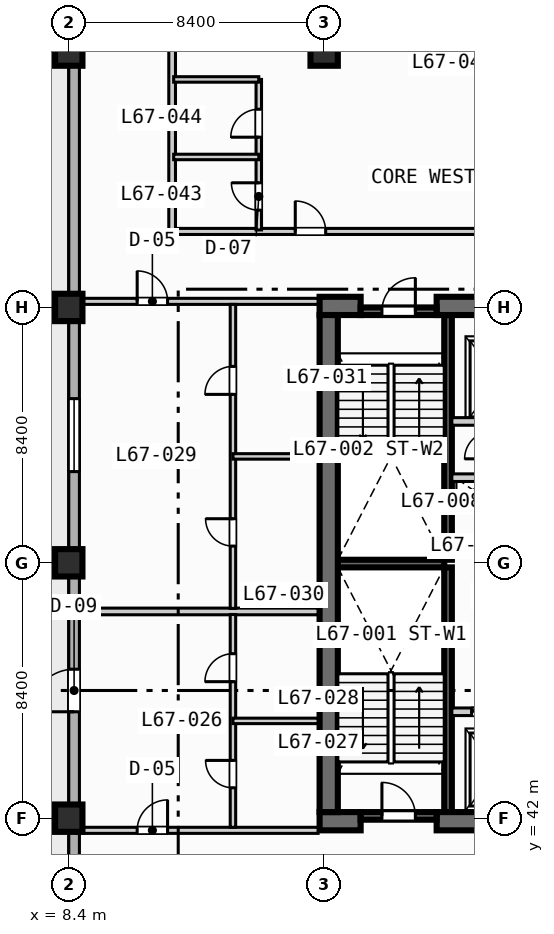
"""IFC4 building model, lengths in metres.
Left out: names, types, materials, properties, quantities, classifications, styles, units other than length and angle.
Written with IfcOpenShell. Run it as: python <this file> out.ifc"""

import sys

from ifc_helpers import new_model, si_unit, direction, frame, frame_2d, origin, origin_2d, place, context, subcontext, project, spatial, rectangle, extrude, element, fill, save


model = new_model("IFC4")
c1 = context("Model", 3, precision=1e-05, world=origin(), true_north=direction((0.0, 1.0)))
c2 = subcontext(c1, "Body", "Model", "MODEL_VIEW")
j1 = project(units=[si_unit("LENGTHUNIT", "METRE"), si_unit("PLANEANGLEUNIT", "RADIAN")], contexts=[c1])
p1 = place(None, origin())
s1 = spatial("IfcSite", under=j1, at=p1, CompositionType="ELEMENT")
p2 = place(p1, origin())
s2 = spatial("IfcBuilding", under=s1, at=p2, CompositionType="ELEMENT")
p3 = place(p2, frame((0.0, 0.0, 271.2)))
s3 = spatial("IfcBuildingStorey", under=s2, at=p3, CompositionType="ELEMENT", Elevation=271.2)
for number, where, z_axis, x_axis in (
    (1, (20.875, 42.2, 0.0), (0.0, 0.0, 1.0), (0.0, 1.0, 0.0)),
    (2, (20.875, 50.5, 0.0), (0.0, 0.0, 1.0), (0.0, 1.0, 0.0)),
):
    element("IfcWall", number, at=place(p3, frame(where, z_axis=z_axis, x_axis=x_axis)), inside=s3, PredefinedType="SOLIDWALL", context=c2, shape_type="SweptSolid", body=[
        extrude(rectangle(XDim=8.05, YDim=0.25, at=frame_2d((4.025, 0.0))), origin(), (0.0, 0.0, 1.0), 3.47),
    ])
p4 = place(p3, frame((17.25, 50.375, 0.0), z_axis=(0.0, 0.0, 1.0), x_axis=(1.0, 0.0, 0.0)))
e3 = element("IfcWall", 3, at=p4, inside=s3, PredefinedType="SOLIDWALL", context=c2, shape_type="SweptSolid", body=[
    extrude(rectangle(XDim=3.5, YDim=0.25, at=frame_2d((1.75, 0.0))), origin(), (0.0, 0.0, 1.0), 3.47),
])
p5 = place(p3, frame((16.65, 41.9, 0.0), z_axis=(0.0, 0.0, 1.0), x_axis=(1.0, 0.0, 0.0)))
e4 = element("IfcWall", 4, at=p5, inside=s3, PredefinedType="SHEAR", context=c2, shape_type="SweptSolid", body=[
    extrude(rectangle(XDim=1.35, YDim=0.6, at=frame_2d((0.675, 0.0))), origin(), (0.0, 0.0, 1.0), 3.47),
])
p6 = place(p3, frame((20.5, 41.9, 0.0), z_axis=(0.0, 0.0, 1.0), x_axis=(1.0, 0.0, 0.0)))
e5 = element("IfcWall", 5, at=p6, inside=s3, PredefinedType="SHEAR", context=c2, shape_type="SweptSolid", body=[
    extrude(rectangle(XDim=5.0, YDim=0.6, at=frame_2d((2.5, 0.0))), origin(), (0.0, 0.0, 1.0), 3.47),
])
p7 = place(p3, frame((16.65, 58.85, 0.0), z_axis=(0.0, 0.0, 1.0), x_axis=(1.0, 0.0, 0.0)))
e6 = element("IfcWall", 6, at=p7, inside=s3, PredefinedType="SHEAR", context=c2, shape_type="SweptSolid", body=[
    extrude(rectangle(XDim=1.35, YDim=0.6, at=frame_2d((0.675, 0.0))), origin(), (0.0, 0.0, 1.0), 3.47),
])
p8 = place(p3, frame((20.5, 58.85, 0.0), z_axis=(0.0, 0.0, 1.0), x_axis=(1.0, 0.0, 0.0)))
e7 = element("IfcWall", 7, at=p8, inside=s3, PredefinedType="SHEAR", context=c2, shape_type="SweptSolid", body=[
    extrude(rectangle(XDim=5.0, YDim=0.6, at=frame_2d((2.5, 0.0))), origin(), (0.0, 0.0, 1.0), 3.47),
])
p9 = place(p3, frame((16.95, 42.2, 0.0), z_axis=(0.0, 0.0, 1.0), x_axis=(0.0, 1.0, 0.0)))
e8 = element("IfcWall", 8, at=p9, inside=s3, PredefinedType="SHEAR", context=c2, shape_type="SweptSolid", body=[
    extrude(rectangle(XDim=16.35, YDim=0.6, at=frame_2d((8.175, 0.0))), origin(), (0.0, 0.0, 1.0), 3.47),
])
for number, where, z_axis, x_axis in (
    (9, (8.4, 42.0, 0.0), (0.0, 0.0, 1.0), (1.0, 0.0, 0.0)),
    (10, (8.4, 50.4, 0.0), (0.0, 0.0, 1.0), (1.0, 0.0, 0.0)),
    (11, (8.4, 58.8, 0.0), (0.0, 0.0, 1.0), (1.0, 0.0, 0.0)),
    (12, (8.4, 67.2, 0.0), (0.0, 0.0, 1.0), (1.0, 0.0, 0.0)),
    (13, (16.8, 67.2, 0.0), (0.0, 0.0, 1.0), (1.0, 0.0, 0.0)),
):
    element("IfcColumn", number, at=place(p3, frame(where, z_axis=z_axis, x_axis=x_axis)), inside=s3, PredefinedType="COLUMN", context=c2, shape_type="SweptSolid", body=[
        extrude(rectangle(XDim=0.9, YDim=0.9, at=origin_2d()), origin(), (0.0, 0.0, 1.0), 3.7),
    ])
p10 = place(p3, frame((8.575, 11.575, 0.0), z_axis=(0.0, 0.0, 1.0), x_axis=(0.0, 1.0, 0.0)))
e14 = element("IfcWall", 14, at=p10, inside=s3, PredefinedType="STANDARD", context=c2, shape_type="SweptSolid", body=[
    extrude(rectangle(XDim=60.85, YDim=0.35, at=frame_2d((30.425, 0.0))), origin(), (0.0, 0.0, 1.0), 3.47),
])
p11 = place(p10, frame((33.925, 0.0, 0.0)))
e15 = element("IfcOpeningElement", 15, at=p11, cuts=e14, PredefinedType="OPENING", context=c2, shape_type="SweptSolid", body=[
    extrude(rectangle(XDim=1.4, YDim=2.2, at=frame_2d((0.7, 1.1))), frame((0.0, 0.185, 0.0), z_axis=(0.0, -1.0, 0.0), x_axis=(1.0, 0.0, 0.0)), (0.0, 0.0, 1.0), 0.37),
])
p12 = place(p10, frame((25.025, 0.0, 0.85)))
e16 = element("IfcOpeningElement", 16, at=p12, cuts=e14, PredefinedType="OPENING", context=c2, shape_type="SweptSolid", body=[
    extrude(rectangle(XDim=2.4, YDim=1.95, at=frame_2d((1.2, 0.975))), frame((0.0, 0.185, 0.0), z_axis=(0.0, -1.0, 0.0), x_axis=(1.0, 0.0, 0.0)), (0.0, 0.0, 1.0), 0.37),
])
p13 = place(p10, frame((41.825, 0.0, 0.85)))
e17 = element("IfcOpeningElement", 17, at=p13, cuts=e14, PredefinedType="OPENING", context=c2, shape_type="SweptSolid", body=[
    extrude(rectangle(XDim=2.4, YDim=1.95, at=frame_2d((1.2, 0.975))), frame((0.0, 0.185, 0.0), z_axis=(0.0, -1.0, 0.0), x_axis=(1.0, 0.0, 0.0)), (0.0, 0.0, 1.0), 0.37),
])
p14 = place(p10, frame((19.25, 0.0, 0.85)))
e18 = element("IfcOpeningElement", 18, at=p14, cuts=e14, PredefinedType="OPENING", context=c2, shape_type="SweptSolid", body=[
    extrude(rectangle(XDim=1.8, YDim=1.8, at=frame_2d((0.9, 0.9))), frame((0.0, 0.185, 0.0), z_axis=(0.0, -1.0, 0.0), x_axis=(1.0, 0.0, 0.0)), (0.0, 0.0, 1.0), 0.37),
])
p15 = place(p3, frame((18.0, 42.075, 0.0), z_axis=(0.0, 0.0, 1.0), x_axis=(1.0, 0.0, 0.0)))
e19 = element("IfcWall", 19, at=p15, inside=s3, PredefinedType="SOLIDWALL", context=c2, shape_type="SweptSolid", body=[
    extrude(rectangle(XDim=2.5, YDim=0.25, at=frame_2d((1.25, 0.0))), origin(), (0.0, 0.0, 1.0), 3.47),
])
p16 = place(p15, frame((0.7, 0.0, 0.0)))
e20 = element("IfcOpeningElement", 20, at=p16, cuts=e19, PredefinedType="OPENING", context=c2, shape_type="SweptSolid", body=[
    extrude(rectangle(XDim=1.1, YDim=2.15, at=frame_2d((0.55, 1.075))), frame((0.0, 0.135, 0.0), z_axis=(0.0, -1.0, 0.0), x_axis=(1.0, 0.0, 0.0)), (0.0, 0.0, 1.0), 0.27),
])
p17 = place(p3, frame((18.0, 58.675, 0.0), z_axis=(0.0, 0.0, 1.0), x_axis=(1.0, 0.0, 0.0)))
e21 = element("IfcWall", 21, at=p17, inside=s3, PredefinedType="SOLIDWALL", context=c2, shape_type="SweptSolid", body=[
    extrude(rectangle(XDim=2.5, YDim=0.25, at=frame_2d((1.25, 0.0))), origin(), (0.0, 0.0, 1.0), 3.47),
])
p18 = place(p17, frame((0.7, 0.0, 0.0)))
e22 = element("IfcOpeningElement", 22, at=p18, cuts=e21, PredefinedType="OPENING", context=c2, shape_type="SweptSolid", body=[
    extrude(rectangle(XDim=1.1, YDim=2.15, at=frame_2d((0.55, 1.075))), frame((0.0, 0.135, 0.0), z_axis=(0.0, -1.0, 0.0), x_axis=(1.0, 0.0, 0.0)), (0.0, 0.0, 1.0), 0.27),
])
p19 = place(p3, frame((21.0, 45.5, 0.0), z_axis=(0.0, 0.0, 1.0), x_axis=(1.0, 0.0, 0.0)))
e23 = element("IfcWall", 23, at=p19, inside=s3, PredefinedType="SOLIDWALL", context=c2, shape_type="SweptSolid", body=[
    extrude(rectangle(XDim=4.15, YDim=0.25, at=frame_2d((2.075, 0.0))), origin(), (0.0, 0.0, 1.0), 3.47),
])
p20 = place(p19, frame((0.65, 0.0, 0.0)))
e24 = element("IfcOpeningElement", 24, at=p20, cuts=e23, PredefinedType="OPENING", context=c2, shape_type="SweptSolid", body=[
    extrude(rectangle(XDim=1.1, YDim=2.15, at=frame_2d((0.55, 1.075))), frame((0.0, 0.135, 0.0), z_axis=(0.0, -1.0, 0.0), x_axis=(1.0, 0.0, 0.0)), (0.0, 0.0, 1.0), 0.27),
])
p21 = place(p3, frame((21.0, 52.34, 0.0), z_axis=(0.0, 0.0, 1.0), x_axis=(1.0, 0.0, 0.0)))
e25 = element("IfcWall", 25, at=p21, inside=s3, PredefinedType="SOLIDWALL", context=c2, shape_type="SweptSolid", body=[
    extrude(rectangle(XDim=3.9, YDim=0.25, at=frame_2d((1.95, 0.0))), origin(), (0.0, 0.0, 1.0), 3.47),
])
p22 = place(p3, frame((21.0, 55.05, 0.0), z_axis=(0.0, 0.0, 1.0), x_axis=(1.0, 0.0, 0.0)))
e26 = element("IfcWall", 26, at=p22, inside=s3, PredefinedType="SOLIDWALL", context=c2, shape_type="SweptSolid", body=[
    extrude(rectangle(XDim=4.15, YDim=0.25, at=frame_2d((2.075, 0.0))), origin(), (0.0, 0.0, 1.0), 3.47),
])
p23 = place(p22, frame((1.85, 0.0, 0.0)))
e27 = element("IfcOpeningElement", 27, at=p23, cuts=e26, PredefinedType="OPENING", context=c2, shape_type="SweptSolid", body=[
    extrude(rectangle(XDim=1.1, YDim=2.15, at=frame_2d((0.55, 1.075))), frame((0.0, 0.135, 0.0), z_axis=(0.0, -1.0, 0.0), x_axis=(1.0, 0.0, 0.0)), (0.0, 0.0, 1.0), 0.27),
])
p24 = place(p3, frame((21.0, 53.2, 0.0), z_axis=(0.0, 0.0, 1.0), x_axis=(1.0, 0.0, 0.0)))
e28 = element("IfcWall", 28, at=p24, inside=s3, PredefinedType="SOLIDWALL", context=c2, shape_type="SweptSolid", body=[
    extrude(rectangle(XDim=1.3, YDim=0.25, at=frame_2d((0.65, 0.0))), origin(), (0.0, 0.0, 1.0), 3.47),
])
p25 = place(p3, frame((8.65, 41.6, 0.0), z_axis=(0.0, 0.0, 1.0), x_axis=(1.0, 0.0, 0.0)))
e29 = element("IfcWall", 29, at=p25, inside=s3, PredefinedType="PARTITIONING", context=c2, shape_type="SweptSolid", body=[
    extrude(rectangle(XDim=7.95, YDim=0.2, at=frame_2d((3.975, 0.0))), origin(), (0.0, 0.0, 1.0), 3.47),
])
p26 = place(p25, frame((2.0, 0.0, 0.0)))
e30 = element("IfcOpeningElement", 30, at=p26, cuts=e29, PredefinedType="OPENING", context=c2, shape_type="SweptSolid", body=[
    extrude(rectangle(XDim=1.0, YDim=2.15, at=frame_2d((0.5, 1.075))), frame((0.0, 0.11, 0.0), z_axis=(0.0, -1.0, 0.0), x_axis=(1.0, 0.0, 0.0)), (0.0, 0.0, 1.0), 0.22),
])
p27 = place(p3, frame((8.65, 59.0, 0.0), z_axis=(0.0, 0.0, 1.0), x_axis=(1.0, 0.0, 0.0)))
e31 = element("IfcWall", 31, at=p27, inside=s3, PredefinedType="PARTITIONING", context=c2, shape_type="SweptSolid", body=[
    extrude(rectangle(XDim=7.95, YDim=0.2, at=frame_2d((3.975, 0.0))), origin(), (0.0, 0.0, 1.0), 3.053),
])
p28 = place(p27, frame((2.0, 0.0, 0.0)))
e32 = element("IfcOpeningElement", 32, at=p28, cuts=e31, PredefinedType="OPENING", context=c2, shape_type="SweptSolid", body=[
    extrude(rectangle(XDim=1.0, YDim=2.15, at=frame_2d((0.5, 1.075))), frame((0.0, 0.11, 0.0), z_axis=(0.0, -1.0, 0.0), x_axis=(1.0, 0.0, 0.0)), (0.0, 0.0, 1.0), 0.22),
])
p29 = place(p3, frame((8.65, 48.8, 0.0), z_axis=(0.0, 0.0, 1.0), x_axis=(1.0, 0.0, 0.0)))
e33 = element("IfcWall", 33, at=p29, inside=s3, PredefinedType="PARTITIONING", context=c2, shape_type="SweptSolid", body=[
    extrude(rectangle(XDim=7.95, YDim=0.22, at=frame_2d((3.975, 0.0))), origin(), (0.0, 0.0, 1.0), 3.47),
])
p30 = place(p3, frame((13.8, 41.7, 0.0), z_axis=(0.0, 0.0, 1.0), x_axis=(0.0, 1.0, 0.0)))
e34 = element("IfcWall", 34, at=p30, inside=s3, PredefinedType="PLUMBINGWALL", context=c2, shape_type="SweptSolid", body=[
    extrude(rectangle(XDim=7.0, YDim=0.18, at=frame_2d((3.5, 0.0))), origin(), (0.0, 0.0, 1.0), 3.47),
])
p31 = place(p30, frame((1.3, 0.0, 0.0)))
e35 = element("IfcOpeningElement", 35, at=p31, cuts=e34, PredefinedType="OPENING", context=c2, shape_type="SweptSolid", body=[
    extrude(rectangle(XDim=0.9, YDim=2.1, at=frame_2d((0.45, 1.05))), frame((0.0, 0.1, 0.0), z_axis=(0.0, -1.0, 0.0), x_axis=(1.0, 0.0, 0.0)), (0.0, 0.0, 1.0), 0.2),
])
p32 = place(p30, frame((4.79, 0.0, 0.0)))
e36 = element("IfcOpeningElement", 36, at=p32, cuts=e34, PredefinedType="OPENING", context=c2, shape_type="SweptSolid", body=[
    extrude(rectangle(XDim=0.92, YDim=2.1, at=frame_2d((0.46, 1.05))), frame((0.0, 0.1, 0.0), z_axis=(0.0, -1.0, 0.0), x_axis=(1.0, 0.0, 0.0)), (0.0, 0.0, 1.0), 0.2),
])
p33 = place(p3, frame((13.8, 45.2, 0.0), z_axis=(0.0, 0.0, 1.0), x_axis=(1.0, 0.0, 0.0)))
e37 = element("IfcWall", 37, at=p33, inside=s3, PredefinedType="PLUMBINGWALL", context=c2, shape_type="SweptSolid", body=[
    extrude(rectangle(XDim=2.8, YDim=0.18, at=frame_2d((1.4, 0.0))), origin(), (0.0, 0.0, 1.0), 3.47),
])
p34 = place(p3, frame((13.8, 48.9, 0.0), z_axis=(0.0, 0.0, 1.0), x_axis=(0.0, 1.0, 0.0)))
e38 = element("IfcWall", 38, at=p34, inside=s3, PredefinedType="PLUMBINGWALL", context=c2, shape_type="SweptSolid", body=[
    extrude(rectangle(XDim=10.0, YDim=0.18, at=frame_2d((5.0, 0.0))), origin(), (0.0, 0.0, 1.0), 3.47),
])
p35 = place(p34, frame((2.05, 0.0, 0.0)))
e39 = element("IfcOpeningElement", 39, at=p35, cuts=e38, PredefinedType="OPENING", context=c2, shape_type="SweptSolid", body=[
    extrude(rectangle(XDim=0.9, YDim=2.1, at=frame_2d((0.45, 1.05))), frame((0.0, 0.1, 0.0), z_axis=(0.0, -1.0, 0.0), x_axis=(1.0, 0.0, 0.0)), (0.0, 0.0, 1.0), 0.2),
])
p36 = place(p34, frame((7.04, 0.0, 0.0)))
e40 = element("IfcOpeningElement", 40, at=p36, cuts=e38, PredefinedType="OPENING", context=c2, shape_type="SweptSolid", body=[
    extrude(rectangle(XDim=0.92, YDim=2.1, at=frame_2d((0.46, 1.05))), frame((0.0, 0.1, 0.0), z_axis=(0.0, -1.0, 0.0), x_axis=(1.0, 0.0, 0.0)), (0.0, 0.0, 1.0), 0.2),
])
p37 = place(p3, frame((13.8, 53.9, 0.0), z_axis=(0.0, 0.0, 1.0), x_axis=(1.0, 0.0, 0.0)))
e41 = element("IfcWall", 41, at=p37, inside=s3, PredefinedType="PLUMBINGWALL", context=c2, shape_type="SweptSolid", body=[
    extrude(rectangle(XDim=2.8, YDim=0.18, at=frame_2d((1.4, 0.0))), origin(), (0.0, 0.0, 1.0), 3.47),
])
p38 = place(p3, frame((11.8, 61.3, 0.0), z_axis=(0.0, 0.0, 1.0), x_axis=(1.0, 0.0, 0.0)))
e42 = element("IfcWall", 42, at=p38, inside=s3, PredefinedType="PARTITIONING", context=c2, shape_type="SweptSolid", body=[
    extrude(rectangle(XDim=21.35, YDim=0.2, at=frame_2d((10.675, 0.0))), origin(), (0.0, 0.0, 1.0), 3.47),
])
p39 = place(p38, frame((4.05, 0.0, 0.0)))
e43 = element("IfcOpeningElement", 43, at=p39, cuts=e42, PredefinedType="OPENING", context=c2, shape_type="SweptSolid", body=[
    extrude(rectangle(XDim=1.0, YDim=2.15, at=frame_2d((0.5, 1.075))), frame((0.0, 0.11, 0.0), z_axis=(0.0, -1.0, 0.0), x_axis=(1.0, 0.0, 0.0)), (0.0, 0.0, 1.0), 0.22),
])
p40 = place(p3, frame((11.8, 61.3, 0.0), z_axis=(0.0, 0.0, 1.0), x_axis=(0.0, 1.0, 0.0)))
e44 = element("IfcWall", 44, at=p40, inside=s3, PredefinedType="PARTITIONING", context=c2, shape_type="SweptSolid", body=[
    extrude(rectangle(XDim=11.1, YDim=0.22, at=frame_2d((5.55, 0.0))), origin(), (0.0, 0.0, 1.0), 3.47),
])
p41 = place(p3, frame((14.65, 61.35, 0.0), z_axis=(0.0, 0.0, 1.0), x_axis=(0.0, 1.0, 0.0)))
e45 = element("IfcWall", 45, at=p41, inside=s3, PredefinedType="PLUMBINGWALL", context=c2, shape_type="SweptSolid", body=[
    extrude(rectangle(XDim=4.95, YDim=0.18, at=frame_2d((2.475, 0.0))), origin(), (0.0, 0.0, 1.0), 3.47),
])
p42 = place(p41, frame((0.65, 0.0, 0.0)))
e46 = element("IfcOpeningElement", 46, at=p42, cuts=e45, PredefinedType="OPENING", context=c2, shape_type="SweptSolid", body=[
    extrude(rectangle(XDim=0.9, YDim=2.1, at=frame_2d((0.45, 1.05))), frame((0.0, 0.1, 0.0), z_axis=(0.0, -1.0, 0.0), x_axis=(1.0, 0.0, 0.0)), (0.0, 0.0, 1.0), 0.2),
])
p43 = place(p41, frame((3.05, 0.0, 0.0)))
e47 = element("IfcOpeningElement", 47, at=p43, cuts=e45, PredefinedType="OPENING", context=c2, shape_type="SweptSolid", body=[
    extrude(rectangle(XDim=0.92, YDim=2.1, at=frame_2d((0.46, 1.05))), frame((0.0, 0.1, 0.0), z_axis=(0.0, -1.0, 0.0), x_axis=(1.0, 0.0, 0.0)), (0.0, 0.0, 1.0), 0.2),
])
for number, where, z_axis, x_axis in (
    (48, (11.85, 63.75, 0.0), (0.0, 0.0, 1.0), (1.0, 0.0, 0.0)),
    (49, (11.85, 66.3, 0.0), (0.0, 0.0, 1.0), (1.0, 0.0, 0.0)),
):
    element("IfcWall", number, at=place(p3, frame(where, z_axis=z_axis, x_axis=x_axis)), inside=s3, PredefinedType="PLUMBINGWALL", context=c2, shape_type="SweptSolid", body=[
        extrude(rectangle(XDim=2.8, YDim=0.18, at=frame_2d((1.4, 0.0))), origin(), (0.0, 0.0, 1.0), 3.47),
    ])
p44 = place(p11, origin())
e50 = element("IfcDoor", 50, at=p44, inside=s3, OperationType="SINGLE_SWING_LEFT", PredefinedType="DOOR", context=c2, shape_type="SweptSolid", body=[
    extrude(rectangle(XDim=1.4, YDim=2.2, at=frame_2d((0.7, 1.1))), frame((0.0, 0.025, 0.0), z_axis=(0.0, -1.0, 0.0), x_axis=(1.0, 0.0, 0.0)), (0.0, 0.0, 1.0), 0.05),
])
fill(e15, e50)
p45 = place(p13, origin())
e51 = element("IfcWindow", 51, at=p45, inside=s3, PartitioningType="SINGLE_PANEL", PredefinedType="WINDOW", context=c2, shape_type="SweptSolid", body=[
    extrude(rectangle(XDim=2.4, YDim=1.95, at=frame_2d((1.2, 0.975))), frame((0.0, 0.03, 0.0), z_axis=(0.0, -1.0, 0.0), x_axis=(1.0, 0.0, 0.0)), (0.0, 0.0, 1.0), 0.06),
])
fill(e17, e51)
p46 = place(p16, origin())
e52 = element("IfcDoor", 52, at=p46, inside=s3, OperationType="SINGLE_SWING_LEFT", PredefinedType="DOOR", context=c2, shape_type="SweptSolid", body=[
    extrude(rectangle(XDim=1.1, YDim=2.15, at=frame_2d((0.55, 1.075))), frame((0.0, 0.025, 0.0), z_axis=(0.0, -1.0, 0.0), x_axis=(1.0, 0.0, 0.0)), (0.0, 0.0, 1.0), 0.05),
])
fill(e20, e52)
p47 = place(p18, origin())
e53 = element("IfcDoor", 53, at=p47, inside=s3, OperationType="SINGLE_SWING_RIGHT", PredefinedType="DOOR", context=c2, shape_type="SweptSolid", body=[
    extrude(rectangle(XDim=1.1, YDim=2.15, at=frame_2d((0.55, 1.075))), frame((0.0, 0.025, 0.0), z_axis=(0.0, -1.0, 0.0), x_axis=(1.0, 0.0, 0.0)), (0.0, 0.0, 1.0), 0.05),
])
fill(e22, e53)
p48 = place(p20, origin())
e54 = element("IfcDoor", 54, at=p48, inside=s3, OperationType="SLIDING_TO_LEFT", PredefinedType="DOOR", context=c2, shape_type="SweptSolid", body=[
    extrude(rectangle(XDim=1.1, YDim=2.15, at=frame_2d((0.55, 1.075))), frame((0.0, 0.025, 0.0), z_axis=(0.0, -1.0, 0.0), x_axis=(1.0, 0.0, 0.0)), (0.0, 0.0, 1.0), 0.05),
])
fill(e24, e54)
p49 = place(p26, origin())
e55 = element("IfcDoor", 55, at=p49, inside=s3, OperationType="SINGLE_SWING_RIGHT", PredefinedType="DOOR", context=c2, shape_type="SweptSolid", body=[
    extrude(rectangle(XDim=1.0, YDim=2.15, at=frame_2d((0.5, 1.075))), frame((0.0, 0.025, 0.0), z_axis=(0.0, -1.0, 0.0), x_axis=(1.0, 0.0, 0.0)), (0.0, 0.0, 1.0), 0.05),
])
fill(e30, e55)
p50 = place(p28, origin())
e56 = element("IfcDoor", 56, at=p50, inside=s3, OperationType="SINGLE_SWING_LEFT", PredefinedType="DOOR", context=c2, shape_type="SweptSolid", body=[
    extrude(rectangle(XDim=1.0, YDim=2.15, at=frame_2d((0.5, 1.075))), frame((0.0, 0.025, 0.0), z_axis=(0.0, -1.0, 0.0), x_axis=(1.0, 0.0, 0.0)), (0.0, 0.0, 1.0), 0.05),
])
fill(e32, e56)
p51 = place(p31, origin())
e57 = element("IfcDoor", 57, at=p51, inside=s3, OperationType="SINGLE_SWING_RIGHT", PredefinedType="DOOR", context=c2, shape_type="SweptSolid", body=[
    extrude(rectangle(XDim=0.9, YDim=2.1, at=frame_2d((0.45, 1.05))), frame((0.0, 0.025, 0.0), z_axis=(0.0, -1.0, 0.0), x_axis=(1.0, 0.0, 0.0)), (0.0, 0.0, 1.0), 0.05),
])
fill(e35, e57)
p52 = place(p32, origin())
e58 = element("IfcDoor", 58, at=p52, inside=s3, OperationType="SINGLE_SWING_LEFT", PredefinedType="DOOR", context=c2, shape_type="SweptSolid", body=[
    extrude(rectangle(XDim=0.92, YDim=2.1, at=frame_2d((0.46, 1.05))), frame((0.0, 0.025, 0.0), z_axis=(0.0, -1.0, 0.0), x_axis=(1.0, 0.0, 0.0)), (0.0, 0.0, 1.0), 0.05),
])
fill(e36, e58)
p53 = place(p35, origin())
e59 = element("IfcDoor", 59, at=p53, inside=s3, OperationType="SINGLE_SWING_RIGHT", PredefinedType="DOOR", context=c2, shape_type="SweptSolid", body=[
    extrude(rectangle(XDim=0.9, YDim=2.1, at=frame_2d((0.45, 1.05))), frame((0.0, 0.025, 0.0), z_axis=(0.0, -1.0, 0.0), x_axis=(1.0, 0.0, 0.0)), (0.0, 0.0, 1.0), 0.05),
])
fill(e39, e59)
p54 = place(p36, origin())
e60 = element("IfcDoor", 60, at=p54, inside=s3, OperationType="SINGLE_SWING_LEFT", PredefinedType="DOOR", context=c2, shape_type="SweptSolid", body=[
    extrude(rectangle(XDim=0.92, YDim=2.1, at=frame_2d((0.46, 1.05))), frame((0.0, 0.025, 0.0), z_axis=(0.0, -1.0, 0.0), x_axis=(1.0, 0.0, 0.0)), (0.0, 0.0, 1.0), 0.05),
])
fill(e40, e60)
p55 = place(p39, origin())
e61 = element("IfcDoor", 61, at=p55, inside=s3, OperationType="SINGLE_SWING_LEFT", PredefinedType="DOOR", context=c2, shape_type="SweptSolid", body=[
    extrude(rectangle(XDim=1.0, YDim=2.15, at=frame_2d((0.5, 1.075))), frame((0.0, 0.025, 0.0), z_axis=(0.0, -1.0, 0.0), x_axis=(1.0, 0.0, 0.0)), (0.0, 0.0, 1.0), 0.05),
])
fill(e43, e61)
p56 = place(p42, origin())
e62 = element("IfcDoor", 62, at=p56, inside=s3, OperationType="SINGLE_SWING_RIGHT", PredefinedType="DOOR", context=c2, shape_type="SweptSolid", body=[
    extrude(rectangle(XDim=0.9, YDim=2.1, at=frame_2d((0.45, 1.05))), frame((0.0, 0.025, 0.0), z_axis=(0.0, -1.0, 0.0), x_axis=(1.0, 0.0, 0.0)), (0.0, 0.0, 1.0), 0.05),
])
fill(e46, e62)
p57 = place(p43, origin())
e63 = element("IfcDoor", 63, at=p57, inside=s3, OperationType="SINGLE_SWING_LEFT", PredefinedType="DOOR", context=c2, shape_type="SweptSolid", body=[
    extrude(rectangle(XDim=0.92, YDim=2.1, at=frame_2d((0.46, 1.05))), frame((0.0, 0.025, 0.0), z_axis=(0.0, -1.0, 0.0), x_axis=(1.0, 0.0, 0.0)), (0.0, 0.0, 1.0), 0.05),
])
fill(e47, e63)
save(model, sys.argv[1])
